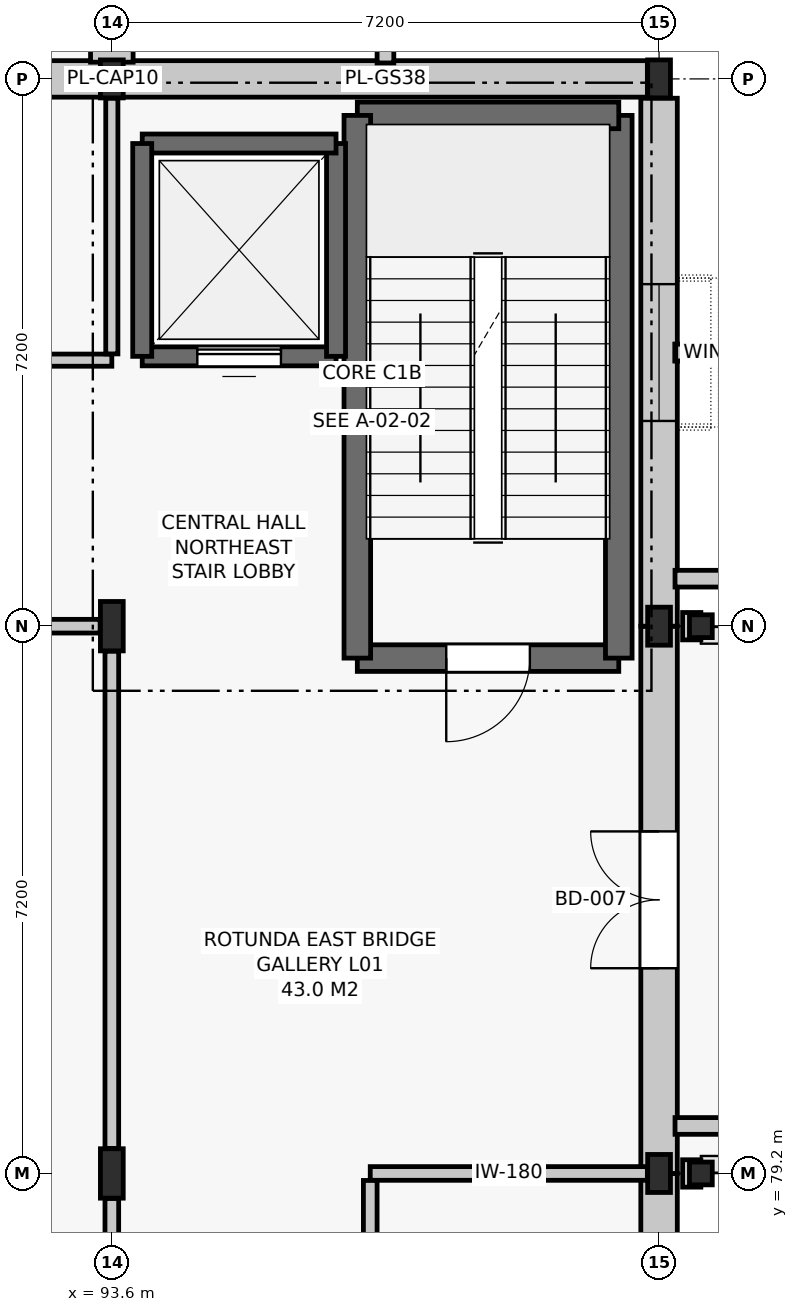
"""IFC4 building model, lengths in metres.
Left out: names, types, materials, properties, quantities, classifications, styles, units other than length and angle.
Written with IfcOpenShell. Run it as: python <this file> out.ifc"""

import sys

from ifc_helpers import new_model, si_unit, direction, frame, frame_2d, origin, origin_2d, place, context, subcontext, project, spatial, rectangle, i_section, extrude, element, fill, save


model = new_model("IFC4")
c1 = context("Model", 3, precision=1e-05, world=origin(), true_north=direction((0.0, 1.0)))
c2 = subcontext(c1, "Body", "Model", "MODEL_VIEW")
j1 = project(units=[si_unit("LENGTHUNIT", "METRE"), si_unit("PLANEANGLEUNIT", "RADIAN")], contexts=[c1])
p1 = place(None, origin())
s1 = spatial("IfcSite", under=j1, at=p1, CompositionType="ELEMENT")
p2 = place(p1, origin())
s2 = spatial("IfcBuilding", under=s1, at=p2, CompositionType="ELEMENT")
p3 = place(p2, frame((0.0, 0.0, 5.4)))
s3 = spatial("IfcBuildingStorey", under=s2, at=p3, CompositionType="ELEMENT", Elevation=5.4)
for number, where, z_axis, x_axis in (
    (1, (93.6, 79.2, 0.0), (0.0, 0.0, 1.0), (1.0, 0.0, 0.0)),
    (2, (93.6, 86.4, 0.0), (0.0, 0.0, 1.0), (1.0, 0.0, 0.0)),
):
    element("IfcColumn", number, at=place(p3, frame(where, z_axis=z_axis, x_axis=x_axis)), inside=s3, PredefinedType="COLUMN", context=c2, shape_type="SweptSolid", body=[
        extrude(i_section(OverallWidth=0.3, OverallDepth=0.65, WebThickness=0.016, FlangeThickness=0.031, FilletRadius=0.027, at=origin_2d()), origin(), (0.0, 0.0, 1.0), 4.8),
    ])
for number, where, z_axis, x_axis in (
    (3, (93.6, 93.6, 0.0), (0.0, 0.0, 1.0), (1.0, 0.0, 0.0)),
    (4, (100.8, 79.2, 0.0), (0.0, 0.0, 1.0), (1.0, 0.0, 0.0)),
    (5, (100.8, 86.4, 0.0), (0.0, 0.0, 1.0), (1.0, 0.0, 0.0)),
    (6, (100.8, 93.6, 0.0), (0.0, 0.0, 1.0), (1.0, 0.0, 0.0)),
):
    element("IfcColumn", number, at=place(p3, frame(where, z_axis=z_axis, x_axis=x_axis)), inside=s3, PredefinedType="COLUMN", context=c2, shape_type="SweptSolid", body=[
        extrude(i_section(OverallWidth=0.3, OverallDepth=0.5, WebThickness=0.014, FlangeThickness=0.028, FilletRadius=0.027, at=origin_2d()), origin(), (0.0, 0.0, 1.0), 4.8),
    ])
for number, where, z_axis, x_axis in (
    (7, (101.35, 79.2, 0.0), (0.0, 0.0, 1.0), (1.0, 0.0, 0.0)),
    (8, (101.35, 86.4, 0.0), (0.0, 0.0, 1.0), (1.0, 0.0, 0.0)),
):
    element("IfcColumn", number, at=place(p3, frame(where, z_axis=z_axis, x_axis=x_axis)), inside=s3, PredefinedType="COLUMN", context=c2, shape_type="SweptSolid", body=[
        extrude(i_section(OverallWidth=0.3, OverallDepth=0.3, WebThickness=0.011, FlangeThickness=0.019, FilletRadius=0.027, at=origin_2d()), origin(), (0.0, 0.0, 1.0), 4.8),
    ])
p4 = place(p3, frame((100.8, 72.0, 0.0), z_axis=(0.0, 0.0, 1.0), x_axis=(0.0, 1.0, 0.0)))
e9 = element("IfcWall", 9, at=p4, inside=s3, PredefinedType="SOLIDWALL", context=c2, shape_type="SweptSolid", body=[
    extrude(rectangle(XDim=7.2, YDim=0.48, at=frame_2d((3.6, 0.0))), origin(), (0.0, 0.0, 1.0), 3.8),
])
p5 = place(p4, frame((2.7, 0.0, 0.9)))
e10 = element("IfcOpeningElement", 10, at=p5, cuts=e9, PredefinedType="OPENING", context=c2, shape_type="SweptSolid", body=[
    extrude(rectangle(XDim=1.8, YDim=2.45, at=frame_2d((0.9, 1.225))), frame((0.0, 0.252, 0.0), z_axis=(0.0, -1.0, 0.0), x_axis=(1.0, 0.0, 0.0)), (0.0, 0.0, 1.0), 0.504),
])
p6 = place(p3, frame((100.8, 79.2, 0.0), z_axis=(0.0, 0.0, 1.0), x_axis=(0.0, 1.0, 0.0)))
e11 = element("IfcWall", 11, at=p6, inside=s3, PredefinedType="SOLIDWALL", context=c2, shape_type="SweptSolid", body=[
    extrude(rectangle(XDim=7.2, YDim=0.48, at=frame_2d((3.6, 0.0))), origin(), (0.0, 0.0, 1.0), 3.8),
])
p7 = place(p6, frame((2.7, 0.0, 0.0)))
e12 = element("IfcOpeningElement", 12, at=p7, cuts=e11, PredefinedType="OPENING", context=c2, shape_type="SweptSolid", body=[
    extrude(rectangle(XDim=1.8, YDim=2.3, at=frame_2d((0.9, 1.15))), frame((0.0, 0.252, 0.0), z_axis=(0.0, -1.0, 0.0), x_axis=(1.0, 0.0, 0.0)), (0.0, 0.0, 1.0), 0.504),
])
p8 = place(p3, frame((100.8, 86.4, 0.0), z_axis=(0.0, 0.0, 1.0), x_axis=(0.0, 1.0, 0.0)))
e13 = element("IfcWall", 13, at=p8, inside=s3, PredefinedType="SOLIDWALL", context=c2, shape_type="SweptSolid", body=[
    extrude(rectangle(XDim=6.946, YDim=0.48, at=frame_2d((3.473, 0.0))), origin(), (0.0, 0.0, 1.0), 3.8),
])
p9 = place(p8, frame((2.7, 0.0, 0.9)))
e14 = element("IfcOpeningElement", 14, at=p9, cuts=e13, PredefinedType="OPENING", context=c2, shape_type="SweptSolid", body=[
    extrude(rectangle(XDim=1.8, YDim=2.45, at=frame_2d((0.9, 1.225))), frame((0.0, 0.252, 0.0), z_axis=(0.0, -1.0, 0.0), x_axis=(1.0, 0.0, 0.0)), (0.0, 0.0, 1.0), 0.504),
])
p10 = place(p3, frame((100.646, 93.6, 0.0), z_axis=(0.0, 0.0, 1.0), x_axis=(-1.0, 0.0, 0.0)))
e15 = element("IfcWall", 15, at=p10, inside=s3, PredefinedType="SOLIDWALL", context=c2, shape_type="SweptSolid", body=[
    extrude(rectangle(XDim=7.046, YDim=0.48, at=frame_2d((3.523, 0.0))), origin(), (0.0, 0.0, 1.0), 3.8),
])
p11 = place(p3, frame((93.6, 93.6, 0.0), z_axis=(0.0, 0.0, 1.0), x_axis=(-1.0, 0.0, 0.0)))
e16 = element("IfcWall", 16, at=p11, inside=s3, PredefinedType="SOLIDWALL", context=c2, shape_type="SweptSolid", body=[
    extrude(rectangle(XDim=7.2, YDim=0.48, at=frame_2d((3.6, 0.0))), origin(), (0.0, 0.0, 1.0), 3.8),
])
p12 = place(p11, frame((2.7, 0.0, 0.9)))
e17 = element("IfcOpeningElement", 17, at=p12, cuts=e16, PredefinedType="OPENING", context=c2, shape_type="SweptSolid", body=[
    extrude(rectangle(XDim=1.8, YDim=2.45, at=frame_2d((0.9, 1.225))), frame((0.0, 0.252, 0.0), z_axis=(0.0, -1.0, 0.0), x_axis=(1.0, 0.0, 0.0)), (0.0, 0.0, 1.0), 0.504),
])
p13 = place(p3, frame((93.6, 93.82, 0.0), z_axis=(0.0, 0.0, 1.0), x_axis=(0.0, 1.0, 0.0)))
e18 = element("IfcWall", 18, at=p13, inside=s3, PredefinedType="SOLIDWALL", context=c2, shape_type="SweptSolid", body=[
    extrude(rectangle(XDim=6.7, YDim=0.56, at=frame_2d((3.35, 0.0))), origin(), (0.0, 0.0, 1.0), 4.05),
])
p14 = place(p3, frame((96.83, 85.98, 0.0), z_axis=(0.0, 0.0, 1.0), x_axis=(1.0, 0.0, 0.0)))
e19 = element("IfcWall", 19, at=p14, inside=s3, PredefinedType="SHEAR", context=c2, shape_type="SweptSolid", body=[
    extrude(rectangle(XDim=3.44, YDim=0.35, at=frame_2d((1.72, 0.0))), origin(), (0.0, 0.0, 1.0), 4.52),
])
p15 = place(p14, frame((1.17, 0.0, 0.0)))
e20 = element("IfcOpeningElement", 20, at=p15, cuts=e19, PredefinedType="OPENING", context=c2, shape_type="SweptSolid", body=[
    extrude(rectangle(XDim=1.1, YDim=2.15, at=frame_2d((0.55, 1.075))), frame((0.0, 0.187, 0.0), z_axis=(0.0, -1.0, 0.0), x_axis=(1.0, 0.0, 0.0)), (0.0, 0.0, 1.0), 0.374),
])
p16 = place(p3, frame((100.27, 85.98, 0.0), z_axis=(0.0, 0.0, 1.0), x_axis=(0.0, 1.0, 0.0)))
e21 = element("IfcWall", 21, at=p16, inside=s3, PredefinedType="SHEAR", context=c2, shape_type="SweptSolid", body=[
    extrude(rectangle(XDim=7.14, YDim=0.35, at=frame_2d((3.57, 0.0))), origin(), (0.0, 0.0, 1.0), 4.52),
])
p17 = place(p3, frame((100.27, 93.12, 0.0), z_axis=(0.0, 0.0, 1.0), x_axis=(-1.0, 0.0, 0.0)))
e22 = element("IfcWall", 22, at=p17, inside=s3, PredefinedType="SHEAR", context=c2, shape_type="SweptSolid", body=[
    extrude(rectangle(XDim=3.44, YDim=0.35, at=frame_2d((1.72, 0.0))), origin(), (0.0, 0.0, 1.0), 4.52),
])
p18 = place(p3, frame((96.83, 93.12, 0.0), z_axis=(0.0, 0.0, 1.0), x_axis=(0.0, -1.0, 0.0)))
e23 = element("IfcWall", 23, at=p18, inside=s3, PredefinedType="SHEAR", context=c2, shape_type="SweptSolid", body=[
    extrude(rectangle(XDim=7.14, YDim=0.35, at=frame_2d((3.57, 0.0))), origin(), (0.0, 0.0, 1.0), 4.52),
])
p19 = place(p3, frame((94.0, 89.95, 0.0), z_axis=(0.0, 0.0, 1.0), x_axis=(1.0, 0.0, 0.0)))
e24 = element("IfcWall", 24, at=p19, inside=s3, PredefinedType="SHEAR", context=c2, shape_type="SweptSolid", body=[
    extrude(rectangle(XDim=2.55, YDim=0.25, at=frame_2d((1.275, 0.0))), origin(), (0.0, 0.0, 1.0), 4.52),
])
p20 = place(p19, frame((0.725, 0.0, 0.0)))
e25 = element("IfcOpeningElement", 25, at=p20, cuts=e24, PredefinedType="OPENING", context=c2, shape_type="SweptSolid", body=[
    extrude(rectangle(XDim=1.1, YDim=2.1, at=frame_2d((0.55, 1.05))), frame((0.0, 0.137, 0.0), z_axis=(0.0, -1.0, 0.0), x_axis=(1.0, 0.0, 0.0)), (0.0, 0.0, 1.0), 0.274),
])
p21 = place(p3, frame((96.55, 89.95, 0.0), z_axis=(0.0, 0.0, 1.0), x_axis=(0.0, 1.0, 0.0)))
e26 = element("IfcWall", 26, at=p21, inside=s3, PredefinedType="SHEAR", context=c2, shape_type="SweptSolid", body=[
    extrude(rectangle(XDim=2.8, YDim=0.25, at=frame_2d((1.4, 0.0))), origin(), (0.0, 0.0, 1.0), 4.52),
])
p22 = place(p3, frame((96.55, 92.75, 0.0), z_axis=(0.0, 0.0, 1.0), x_axis=(-1.0, 0.0, 0.0)))
e27 = element("IfcWall", 27, at=p22, inside=s3, PredefinedType="SHEAR", context=c2, shape_type="SweptSolid", body=[
    extrude(rectangle(XDim=2.55, YDim=0.25, at=frame_2d((1.275, 0.0))), origin(), (0.0, 0.0, 1.0), 4.52),
])
p23 = place(p3, frame((94.0, 92.75, 0.0), z_axis=(0.0, 0.0, 1.0), x_axis=(0.0, -1.0, 0.0)))
e28 = element("IfcWall", 28, at=p23, inside=s3, PredefinedType="SHEAR", context=c2, shape_type="SweptSolid", body=[
    extrude(rectangle(XDim=2.8, YDim=0.25, at=frame_2d((1.4, 0.0))), origin(), (0.0, 0.0, 1.0), 4.52),
])
p24 = place(p3, frame((97.0, 79.2, 0.0), z_axis=(0.0, 0.0, 1.0), x_axis=(1.0, 0.0, 0.0)))
e29 = element("IfcWall", 29, at=p24, inside=s3, PredefinedType="PARTITIONING", context=c2, shape_type="SweptSolid", body=[
    extrude(rectangle(XDim=3.646, YDim=0.18, at=frame_2d((1.823, 0.0))), origin(), (0.0, 0.0, 1.0), 4.055),
])
p25 = place(p3, frame((86.554, 86.4, 0.0), z_axis=(0.0, 0.0, 1.0), x_axis=(1.0, 0.0, 0.0)))
e30 = element("IfcWall", 30, at=p25, inside=s3, PredefinedType="PARTITIONING", context=c2, shape_type="SweptSolid", body=[
    extrude(rectangle(XDim=6.892, YDim=0.18, at=frame_2d((3.446, 0.0))), origin(), (0.0, 0.0, 1.0), 4.505),
])
p26 = place(p3, frame((69.202, 89.9, 0.0), z_axis=(0.0, 0.0, 1.0), x_axis=(1.0, 0.0, 0.0)))
e31 = element("IfcWall", 31, at=p26, inside=s3, PredefinedType="PARTITIONING", context=c2, shape_type="SweptSolid", body=[
    extrude(rectangle(XDim=24.398, YDim=0.16, at=frame_2d((12.199, 0.0))), origin(), (0.0, 0.0, 1.0), 4.065),
])
p27 = place(p26, frame((11.699, 0.0, 0.0)))
e32 = element("IfcOpeningElement", 32, at=p27, cuts=e31, PredefinedType="OPENING", context=c2, shape_type="SweptSolid", body=[
    extrude(rectangle(XDim=1.0, YDim=2.15, at=frame_2d((0.5, 1.075))), frame((0.0, 0.092, 0.0), z_axis=(0.0, -1.0, 0.0), x_axis=(1.0, 0.0, 0.0)), (0.0, 0.0, 1.0), 0.184),
])
p28 = place(p3, frame((97.0, 61.272, 0.0), z_axis=(0.0, 0.0, 1.0), x_axis=(0.0, 1.0, 0.0)))
e33 = element("IfcWall", 33, at=p28, inside=s3, PredefinedType="PARTITIONING", context=c2, shape_type="SweptSolid", body=[
    extrude(rectangle(XDim=17.836, YDim=0.18, at=frame_2d((8.918, 0.0))), origin(), (0.0, 0.0, 1.0), 4.055),
])
p29 = place(p28, frame((9.737, 0.0, 0.0)))
e34 = element("IfcOpeningElement", 34, at=p29, cuts=e33, PredefinedType="OPENING", context=c2, shape_type="SweptSolid", body=[
    extrude(rectangle(XDim=1.65, YDim=2.25, at=frame_2d((0.825, 1.125))), frame((0.0, 0.102, 0.0), z_axis=(0.0, -1.0, 0.0), x_axis=(1.0, 0.0, 0.0)), (0.0, 0.0, 1.0), 0.204),
])
for number, where, z_axis, x_axis in (
    (35, (93.6, 72.329, 0.0), (0.0, 0.0, 1.0), (0.0, 1.0, 0.0)),
    (36, (93.6, 79.529, 0.0), (0.0, 0.0, 1.0), (0.0, 1.0, 0.0)),
):
    element("IfcWall", number, at=place(p3, frame(where, z_axis=z_axis, x_axis=x_axis)), inside=s3, PredefinedType="PARTITIONING", context=c2, shape_type="SweptSolid", body=[
        extrude(rectangle(XDim=6.542, YDim=0.18, at=frame_2d((3.271, 0.0))), origin(), (0.0, 0.0, 1.0), 4.505),
    ])
p30 = place(p3, frame((93.6, 89.982, 0.0), z_axis=(0.0, 0.0, 1.0), x_axis=(0.0, 1.0, 0.0)))
e37 = element("IfcWall", 37, at=p30, inside=s3, PredefinedType="PARTITIONING", context=c2, shape_type="SweptSolid", body=[
    extrude(rectangle(XDim=3.364, YDim=0.16, at=frame_2d((1.682, 0.0))), origin(), (0.0, 0.0, 1.0), 4.065),
])
p31 = place(p7, origin())
e38 = element("IfcDoor", 38, at=p31, inside=s3, OperationType="DOUBLE_DOOR_SINGLE_SWING", PredefinedType="DOOR", context=c2, shape_type="SweptSolid", body=[
    extrude(rectangle(XDim=1.8, YDim=2.3, at=frame_2d((0.9, 1.15))), frame((0.0, 0.025, 0.0), z_axis=(0.0, -1.0, 0.0), x_axis=(1.0, 0.0, 0.0)), (0.0, 0.0, 1.0), 0.05),
])
fill(e12, e38)
p32 = place(p9, origin())
e39 = element("IfcWindow", 39, at=p32, inside=s3, PartitioningType="SINGLE_PANEL", PredefinedType="WINDOW", context=c2, shape_type="SweptSolid", body=[
    extrude(rectangle(XDim=1.8, YDim=2.45, at=frame_2d((0.9, 1.225))), frame((0.0, 0.03, 0.0), z_axis=(0.0, -1.0, 0.0), x_axis=(1.0, 0.0, 0.0)), (0.0, 0.0, 1.0), 0.06),
])
fill(e14, e39)
p33 = place(p15, frame((1.1, 0.0, 0.0), z_axis=(0.0, 0.0, 1.0), x_axis=(-1.0, 0.0, 0.0)))
e40 = element("IfcDoor", 40, at=p33, inside=s3, OperationType="SINGLE_SWING_RIGHT", PredefinedType="DOOR", context=c2, shape_type="SweptSolid", body=[
    extrude(rectangle(XDim=1.1, YDim=2.15, at=frame_2d((0.55, 1.075))), frame((0.0, 0.025, 0.0), z_axis=(0.0, -1.0, 0.0), x_axis=(1.0, 0.0, 0.0)), (0.0, 0.0, 1.0), 0.05),
])
fill(e20, e40)
p34 = place(p20, origin())
e41 = element("IfcDoor", 41, at=p34, inside=s3, OperationType="SLIDING_TO_LEFT", PredefinedType="DOOR", context=c2, shape_type="SweptSolid", body=[
    extrude(rectangle(XDim=1.1, YDim=2.1, at=frame_2d((0.55, 1.05))), frame((0.0, 0.025, 0.0), z_axis=(0.0, -1.0, 0.0), x_axis=(1.0, 0.0, 0.0)), (0.0, 0.0, 1.0), 0.05),
])
fill(e25, e41)
save(model, sys.argv[1])
